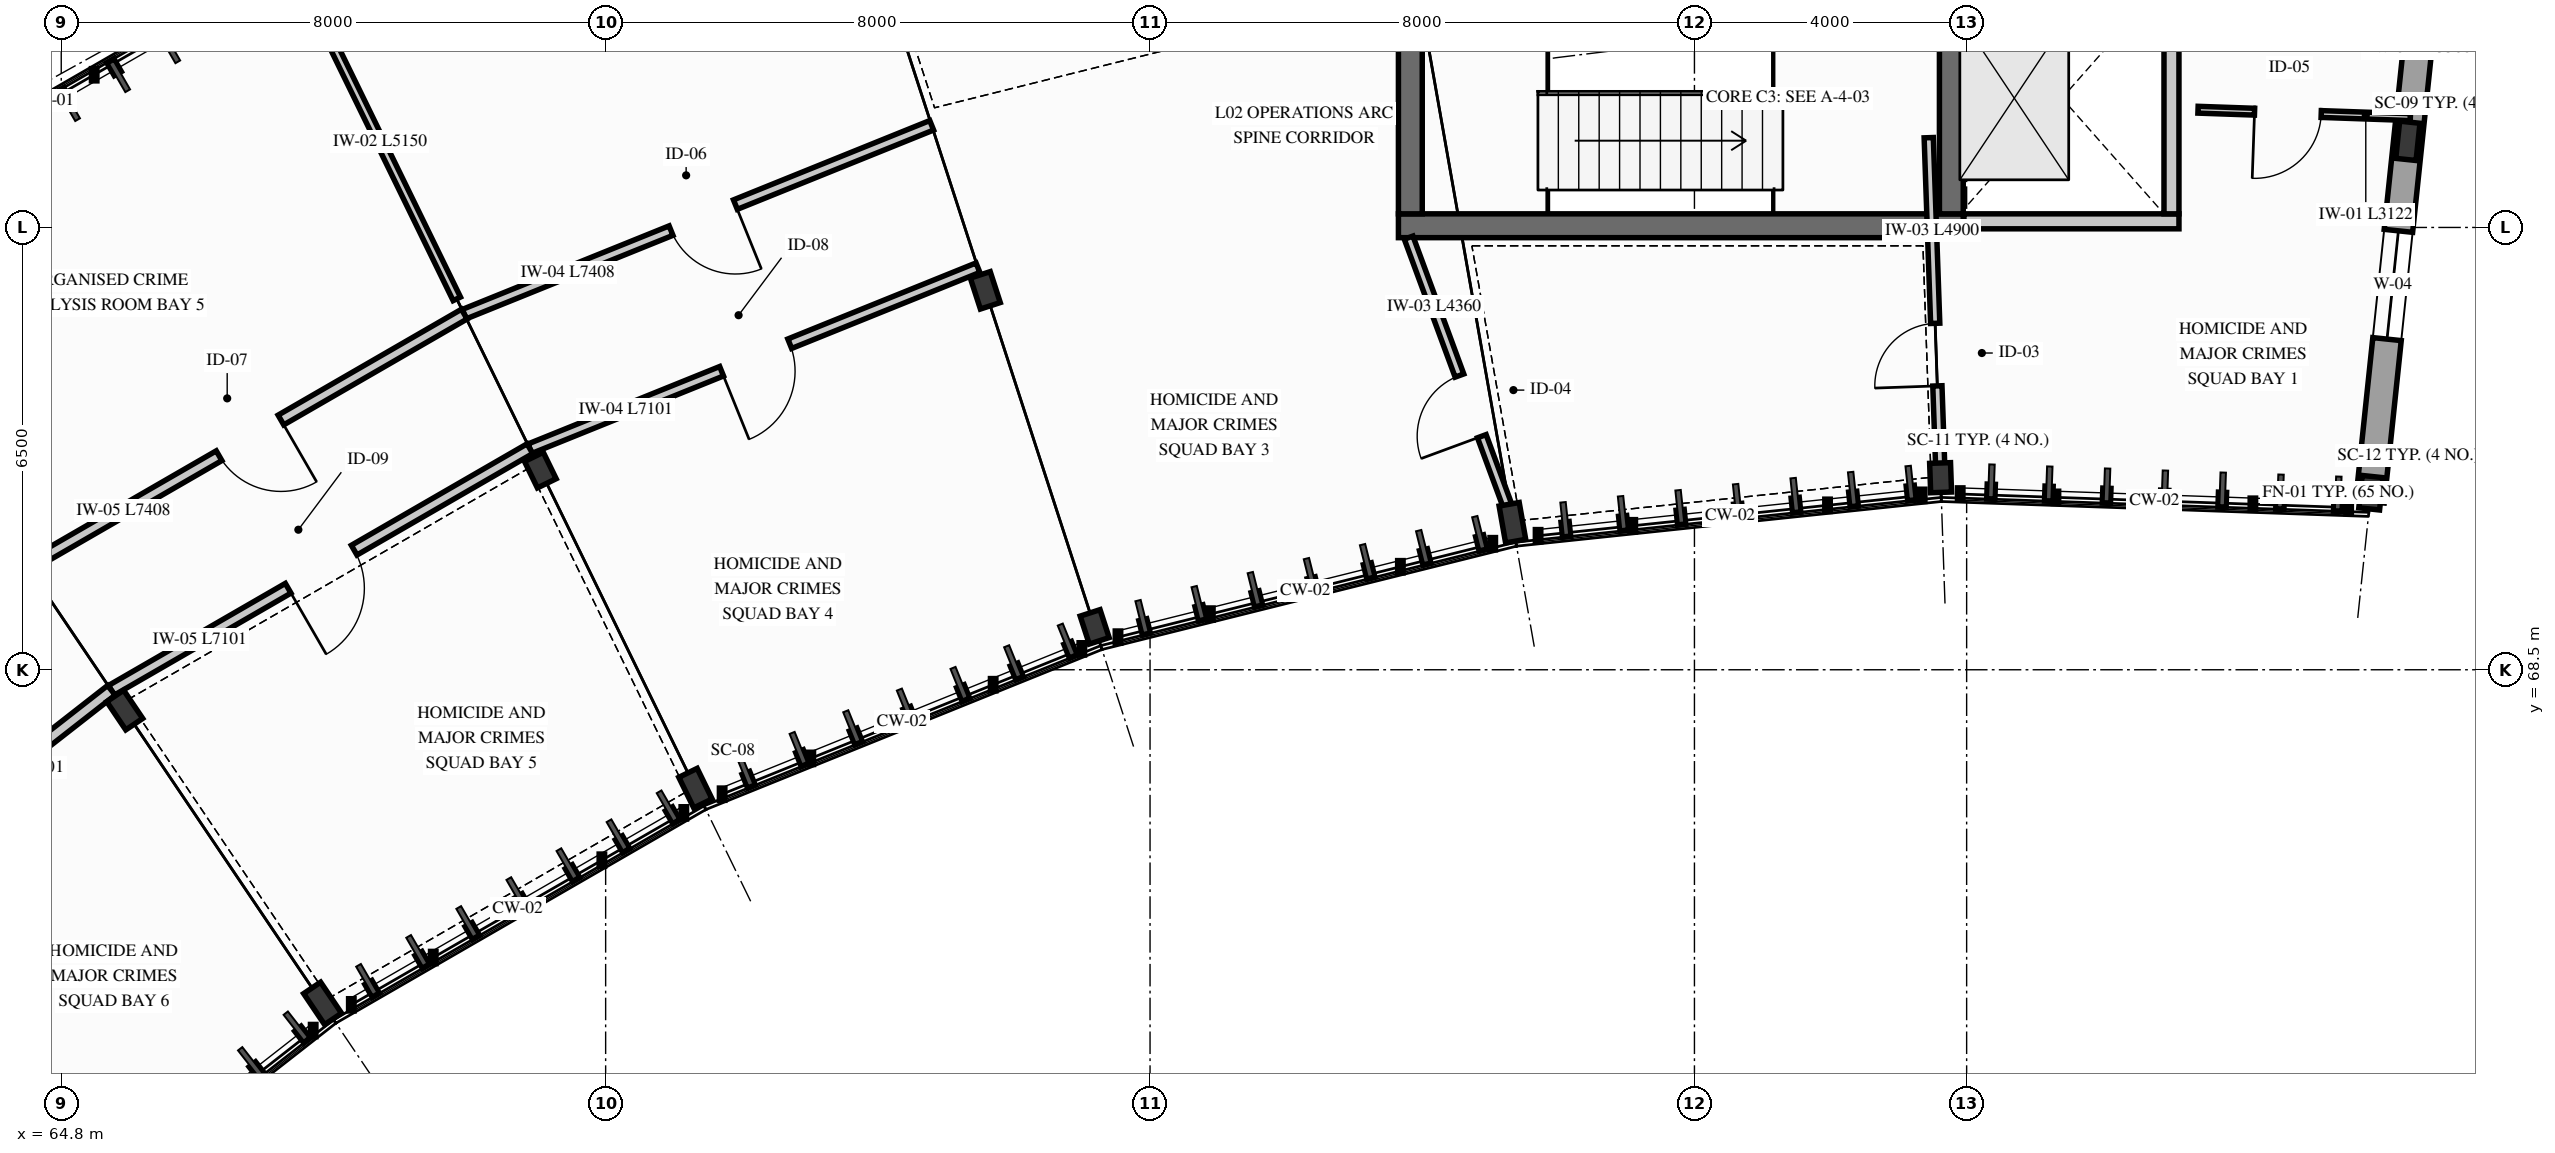
"""IFC4 building model, lengths in metres.
Left out: names, types, materials, properties, quantities, classifications, styles, units other than length and angle.
Written with IfcOpenShell. Run it as: python <this file> out.ifc"""

import sys

from ifc_helpers import new_model, si_unit, direction, frame, frame_2d, origin, origin_2d, place, context, subcontext, project, spatial, rectangle, i_section, extrude, element, fill, save


model = new_model("IFC4")
c1 = context("Model", 3, precision=1e-05, world=origin(), true_north=direction((0.0, 1.0)))
c2 = subcontext(c1, "Body", "Model", "MODEL_VIEW")
j1 = project(units=[si_unit("LENGTHUNIT", "METRE"), si_unit("PLANEANGLEUNIT", "RADIAN")], contexts=[c1])
p1 = place(None, origin())
s1 = spatial("IfcSite", under=j1, at=p1, CompositionType="ELEMENT")
p2 = place(p1, origin())
s2 = spatial("IfcBuilding", under=s1, at=p2, CompositionType="ELEMENT")
p3 = place(p2, frame((0.0, 0.0, 9.3)))
s3 = spatial("IfcBuildingStorey", under=s2, at=p3, CompositionType="ELEMENT", Elevation=9.3)
p4 = place(p3, frame((84.45, 75.025, 0.0), z_axis=(0.0, 0.0, 1.0), x_axis=(1.0, 0.0, 0.0)))
e1 = element("IfcWall", 1, at=p4, inside=s3, PredefinedType="SHEAR", context=c2, shape_type="SweptSolid", body=[
    extrude(rectangle(XDim=8.3, YDim=0.35, at=frame_2d((4.15, 0.0))), origin(), (0.0, 0.0, 1.0), 4.0),
])
p5 = place(p3, frame((84.625, 75.2, 0.0), z_axis=(0.0, 0.0, 1.0), x_axis=(0.0, 1.0, 0.0)))
e2 = element("IfcWall", 2, at=p5, inside=s3, PredefinedType="SHEAR", context=c2, shape_type="SweptSolid", body=[
    extrude(rectangle(XDim=6.8, YDim=0.35, at=frame_2d((3.4, 0.0))), origin(), (0.0, 0.0, 1.0), 4.0),
])
p6 = place(p5, frame((2.6, 0.0, 0.0)))
e3 = element("IfcOpeningElement", 3, at=p6, cuts=e2, PredefinedType="OPENING", context=c2, shape_type="SweptSolid", body=[
    extrude(rectangle(XDim=1.25, YDim=2.2, at=frame_2d((0.625, 1.1))), frame((0.0, 0.185, 0.0), z_axis=(0.0, -1.0, 0.0), x_axis=(1.0, 0.0, 0.0)), (0.0, 0.0, 1.0), 0.37),
])
p7 = place(p3, frame((92.575, 75.2, 0.0), z_axis=(0.0, 0.0, 1.0), x_axis=(0.0, 1.0, 0.0)))
e4 = element("IfcWall", 4, at=p7, inside=s3, PredefinedType="SHEAR", context=c2, shape_type="SweptSolid", body=[
    extrude(rectangle(XDim=6.8, YDim=0.35, at=frame_2d((3.4, 0.0))), origin(), (0.0, 0.0, 1.0), 4.0),
])
p8 = place(p3, frame((98.74, 71.102, 0.0), z_axis=(0.0, 0.0, 1.0), x_axis=(0.994521895368, -0.104528463268, 0.0)))
e5 = element("IfcColumn", 5, at=p8, inside=s3, PredefinedType="COLUMN", context=c2, shape_type="SweptSolid", body=[
    extrude(i_section(OverallWidth=0.307, OverallDepth=0.478, WebThickness=0.021, FlangeThickness=0.04, FilletRadius=0.027, at=origin_2d()), origin(), (0.0, 0.0, 1.0), 4.2),
])
p9 = place(p3, frame((99.284, 76.273, 0.0), z_axis=(0.0, 0.0, 1.0), x_axis=(0.994521895368, -0.104528463268, 0.0)))
e6 = element("IfcColumn", 6, at=p9, inside=s3, PredefinedType="COLUMN", context=c2, shape_type="SweptSolid", body=[
    extrude(i_section(OverallWidth=0.3, OverallDepth=0.55, WebThickness=0.015, FlangeThickness=0.029, FilletRadius=0.027, at=origin_2d()), origin(), (0.0, 0.0, 1.0), 4.2),
])
p10 = place(p3, frame((92.417, 71.323, 0.0), z_axis=(0.0, 0.0, 1.0), x_axis=(0.999390827019, 0.034899496703, 0.0)))
e7 = element("IfcColumn", 7, at=p10, inside=s3, PredefinedType="COLUMN", context=c2, shape_type="SweptSolid", body=[
    extrude(i_section(OverallWidth=0.307, OverallDepth=0.432, WebThickness=0.021, FlangeThickness=0.04, FilletRadius=0.027, at=origin_2d()), origin(), (0.0, 0.0, 1.0), 4.2),
])
p11 = place(p3, frame((86.125, 70.661, 0.0), z_axis=(0.0, 0.0, 1.0), x_axis=(0.984807753012, 0.173648177667, 0.0)))
e8 = element("IfcColumn", 8, at=p11, inside=s3, PredefinedType="COLUMN", context=c2, shape_type="SweptSolid", body=[
    extrude(i_section(OverallWidth=0.3, OverallDepth=0.55, WebThickness=0.015, FlangeThickness=0.029, FilletRadius=0.027, at=origin_2d()), origin(), (0.0, 0.0, 1.0), 4.2),
])
p12 = place(p3, frame((79.986, 69.13, 0.0), z_axis=(0.0, 0.0, 1.0), x_axis=(0.951056516295, 0.309016994375, 0.0)))
e9 = element("IfcColumn", 9, at=p12, inside=s3, PredefinedType="COLUMN", context=c2, shape_type="SweptSolid", body=[
    extrude(i_section(OverallWidth=0.307, OverallDepth=0.432, WebThickness=0.021, FlangeThickness=0.04, FilletRadius=0.027, at=origin_2d()), origin(), (0.0, 0.0, 1.0), 4.2),
])
p13 = place(p3, frame((78.379, 74.076, 0.0), z_axis=(0.0, 0.0, 1.0), x_axis=(0.951056516295, 0.309016994375, 0.0)))
e10 = element("IfcColumn", 10, at=p13, inside=s3, PredefinedType="COLUMN", context=c2, shape_type="SweptSolid", body=[
    extrude(i_section(OverallWidth=0.307, OverallDepth=0.478, WebThickness=0.021, FlangeThickness=0.04, FilletRadius=0.027, at=origin_2d()), origin(), (0.0, 0.0, 1.0), 4.2),
])
p14 = place(p3, frame((74.12, 66.76, 0.0), z_axis=(0.0, 0.0, 1.0), x_axis=(0.898794046299, 0.438371146789, 0.0)))
e11 = element("IfcColumn", 11, at=p14, inside=s3, PredefinedType="COLUMN", context=c2, shape_type="SweptSolid", body=[
    extrude(i_section(OverallWidth=0.3, OverallDepth=0.5, WebThickness=0.014, FlangeThickness=0.028, FilletRadius=0.027, at=origin_2d()), origin(), (0.0, 0.0, 1.0), 4.2),
])
p15 = place(p3, frame((71.84, 71.434, 0.0), z_axis=(0.0, 0.0, 1.0), x_axis=(0.898794046299, 0.438371146789, 0.0)))
e12 = element("IfcColumn", 12, at=p15, inside=s3, PredefinedType="COLUMN", context=c2, shape_type="SweptSolid", body=[
    extrude(i_section(OverallWidth=0.307, OverallDepth=0.432, WebThickness=0.021, FlangeThickness=0.04, FilletRadius=0.027, at=origin_2d()), origin(), (0.0, 0.0, 1.0), 4.2),
])
p16 = place(p3, frame((68.641, 63.597, 0.0), z_axis=(0.0, 0.0, 1.0), x_axis=(0.829037572555, 0.559192903471, 0.0)))
e13 = element("IfcColumn", 13, at=p16, inside=s3, PredefinedType="COLUMN", context=c2, shape_type="SweptSolid", body=[
    extrude(i_section(OverallWidth=0.3, OverallDepth=0.55, WebThickness=0.015, FlangeThickness=0.029, FilletRadius=0.027, at=origin_2d()), origin(), (0.0, 0.0, 1.0), 4.2),
])
p17 = place(p3, frame((65.733, 67.908, 0.0), z_axis=(0.0, 0.0, 1.0), x_axis=(0.829037572555, 0.559192903471, 0.0)))
e14 = element("IfcColumn", 14, at=p17, inside=s3, PredefinedType="COLUMN", context=c2, shape_type="SweptSolid", body=[
    extrude(i_section(OverallWidth=0.3, OverallDepth=0.5, WebThickness=0.014, FlangeThickness=0.028, FilletRadius=0.027, at=origin_2d()), origin(), (0.0, 0.0, 1.0), 4.2),
])
p18 = place(p3, frame((98.727, 70.972, 0.0), z_axis=(0.0, 0.0, 1.0), x_axis=(0.104534827036, 0.994521226489, 0.0)))
e15 = element("IfcWall", 15, at=p18, inside=s3, PredefinedType="SOLIDWALL", context=c2, shape_type="SweptSolid", body=[
    extrude(rectangle(XDim=13.56, YDim=0.42, at=frame_2d((6.78, 0.0))), origin(), (0.0, 0.0, 1.0), 3.55),
])
p19 = place(p18, frame((2.4, 0.0, 0.74)))
e16 = element("IfcOpeningElement", 16, at=p19, cuts=e15, PredefinedType="OPENING", context=c2, shape_type="SweptSolid", body=[
    extrude(rectangle(XDim=1.6, YDim=2.4, at=frame_2d((0.8, 1.2))), frame((0.0, 0.22, 0.0), z_axis=(0.0, -1.0, 0.0), x_axis=(1.0, 0.0, 0.0)), (0.0, 0.0, 1.0), 0.44),
])
p20 = place(p18, frame((9.4, 0.0, 0.74)))
e17 = element("IfcOpeningElement", 17, at=p20, cuts=e15, PredefinedType="OPENING", context=c2, shape_type="SweptSolid", body=[
    extrude(rectangle(XDim=1.6, YDim=2.4, at=frame_2d((0.8, 1.2))), frame((0.0, 0.22, 0.0), z_axis=(0.0, -1.0, 0.0), x_axis=(1.0, 0.0, 0.0)), (0.0, 0.0, 1.0), 0.44),
])
p21 = place(p3, frame((92.76, 75.09, 0.0), z_axis=(0.0, 0.0, 1.0), x_axis=(1.0, 0.0, 0.0)))
e18 = element("IfcWall", 18, at=p21, inside=s3, PredefinedType="PARTITIONING", context=c2, shape_type="SweptSolid", body=[
    extrude(rectangle(XDim=3.16, YDim=0.22, at=frame_2d((1.58, 0.0))), origin(), (0.0, 0.0, 1.0), 3.92),
])
p22 = place(p3, frame((95.81, 75.2, 0.0), z_axis=(0.0, 0.0, 1.0), x_axis=(0.0, 1.0, 0.0)))
e19 = element("IfcWall", 19, at=p22, inside=s3, PredefinedType="PARTITIONING", context=c2, shape_type="SweptSolid", body=[
    extrude(rectangle(XDim=3.4, YDim=0.22, at=frame_2d((1.7, 0.0))), origin(), (0.0, 0.0, 1.0), 3.92),
])
p23 = place(p3, frame((92.414, 71.422, 0.0), z_axis=(0.0, 0.0, 1.0), x_axis=(-0.034877560821, 0.999391592796, 0.0)))
e20 = element("IfcWall", 20, at=p23, inside=s3, PredefinedType="PARTITIONING", context=c2, shape_type="SweptSolid", body=[
    extrude(rectangle(XDim=4.9, YDim=0.135, at=frame_2d((2.45, 0.0))), origin(), (0.0, 0.0, 1.0), 3.92),
])
p24 = place(p23, frame((1.25, 0.0, 0.0)))
e21 = element("IfcOpeningElement", 21, at=p24, cuts=e20, PredefinedType="OPENING", context=c2, shape_type="SweptSolid", body=[
    extrude(rectangle(XDim=0.92, YDim=2.12, at=frame_2d((0.46, 1.06))), frame((0.0, 0.077, 0.0), z_axis=(0.0, -1.0, 0.0), x_axis=(1.0, 0.0, 0.0)), (0.0, 0.0, 1.0), 0.155),
])
p25 = place(p3, frame((86.108, 70.76, 0.0), z_axis=(0.0, 0.0, 1.0), x_axis=(-0.345809164341, 0.938304866159, 0.0)))
e22 = element("IfcWall", 22, at=p25, inside=s3, PredefinedType="PARTITIONING", context=c2, shape_type="SweptSolid", body=[
    extrude(rectangle(XDim=4.36, YDim=0.135, at=frame_2d((2.18, 0.0))), origin(), (0.0, 0.0, 1.0), 3.92),
])
p26 = place(p25, frame((1.25, 0.0, 0.0)))
e23 = element("IfcOpeningElement", 23, at=p26, cuts=e22, PredefinedType="OPENING", context=c2, shape_type="SweptSolid", body=[
    extrude(rectangle(XDim=0.95, YDim=2.15, at=frame_2d((0.475, 1.075))), frame((0.0, 0.077, 0.0), z_axis=(0.0, -1.0, 0.0), x_axis=(1.0, 0.0, 0.0)), (0.0, 0.0, 1.0), 0.155),
])
p27 = place(p3, frame((99.321, 76.621, 0.0), z_axis=(0.0, 0.0, 1.0), x_axis=(-0.999389073029, 0.034949688284, 0.0)))
e24 = element("IfcWall", 24, at=p27, inside=s3, PredefinedType="PARTITIONING", context=c2, shape_type="SweptSolid", body=[
    extrude(rectangle(XDim=3.123, YDim=0.1, at=frame_2d((1.561, 0.0))), origin(), (0.0, 0.0, 1.0), 3.92),
])
p28 = place(p27, frame((1.311, 0.0, 0.0)))
e25 = element("IfcOpeningElement", 25, at=p28, cuts=e24, PredefinedType="OPENING", context=c2, shape_type="SweptSolid", body=[
    extrude(rectangle(XDim=0.98, YDim=2.16, at=frame_2d((0.49, 1.08))), frame((0.0, 0.06, 0.0), z_axis=(0.0, -1.0, 0.0), x_axis=(1.0, 0.0, 0.0)), (0.0, 0.0, 1.0), 0.12),
])
p29 = place(p3, frame((78.271, 74.409, 0.0), z_axis=(0.0, 0.0, 1.0), x_axis=(-0.927181218568, -0.374613117677, 0.0)))
e26 = element("IfcWall", 26, at=p29, inside=s3, PredefinedType="PARTITIONING", context=c2, shape_type="SweptSolid", body=[
    extrude(rectangle(XDim=7.101, YDim=0.15, at=frame_2d((3.551, 0.0))), origin(), (0.0, 0.0, 1.0), 3.92),
])
p30 = place(p29, frame((2.983, 0.0, 0.0)))
e27 = element("IfcOpeningElement", 27, at=p30, cuts=e26, PredefinedType="OPENING", context=c2, shape_type="SweptSolid", body=[
    extrude(rectangle(XDim=1.08, YDim=2.22, at=frame_2d((0.54, 1.11))), frame((0.0, 0.085, 0.0), z_axis=(0.0, -1.0, 0.0), x_axis=(1.0, 0.0, 0.0)), (0.0, 0.0, 1.0), 0.17),
])
p31 = place(p3, frame((77.591, 76.501, 0.0), z_axis=(0.0, 0.0, 1.0), x_axis=(-0.927187035022, -0.374598721418, 0.0)))
e28 = element("IfcWall", 28, at=p31, inside=s3, PredefinedType="PARTITIONING", context=c2, shape_type="SweptSolid", body=[
    extrude(rectangle(XDim=7.408, YDim=0.15, at=frame_2d((3.704, 0.0))), origin(), (0.0, 0.0, 1.0), 3.92),
])
p32 = place(p31, frame((3.111, 0.0, 0.0)))
e29 = element("IfcOpeningElement", 29, at=p32, cuts=e28, PredefinedType="OPENING", context=c2, shape_type="SweptSolid", body=[
    extrude(rectangle(XDim=1.02, YDim=2.18, at=frame_2d((0.51, 1.09))), frame((0.0, 0.085, 0.0), z_axis=(0.0, -1.0, 0.0), x_axis=(1.0, 0.0, 0.0)), (0.0, 0.0, 1.0), 0.17),
])
p33 = place(p3, frame((70.613, 73.951, 0.0), z_axis=(0.0, 0.0, 1.0), x_axis=(-0.438355450259, 0.898801701839, 0.0)))
e30 = element("IfcWall", 30, at=p33, inside=s3, PredefinedType="PARTITIONING", context=c2, shape_type="SweptSolid", body=[
    extrude(rectangle(XDim=5.15, YDim=0.12, at=frame_2d((2.575, 0.0))), origin(), (0.0, 0.0, 1.0), 3.55),
])
p34 = place(p3, frame((71.687, 71.749, 0.0), z_axis=(0.0, 0.0, 1.0), x_axis=(-0.866032151687, -0.499988312107, 0.0)))
e31 = element("IfcWall", 31, at=p34, inside=s3, PredefinedType="PARTITIONING", context=c2, shape_type="SweptSolid", body=[
    extrude(rectangle(XDim=7.101, YDim=0.165, at=frame_2d((3.551, 0.0))), origin(), (0.0, 0.0, 1.0), 3.92),
])
p35 = place(p34, frame((2.982, 0.0, 0.0)))
e32 = element("IfcOpeningElement", 32, at=p35, cuts=e31, PredefinedType="OPENING", context=c2, shape_type="SweptSolid", body=[
    extrude(rectangle(XDim=1.12, YDim=2.2, at=frame_2d((0.56, 1.1))), frame((0.0, 0.093, 0.0), z_axis=(0.0, -1.0, 0.0), x_axis=(1.0, 0.0, 0.0)), (0.0, 0.0, 1.0), 0.185),
])
p36 = place(p3, frame((70.722, 73.726, 0.0), z_axis=(0.0, 0.0, 1.0), x_axis=(-0.866019843608, -0.500009630384, 0.0)))
e33 = element("IfcWall", 33, at=p36, inside=s3, PredefinedType="PARTITIONING", context=c2, shape_type="SweptSolid", body=[
    extrude(rectangle(XDim=7.408, YDim=0.165, at=frame_2d((3.704, 0.0))), origin(), (0.0, 0.0, 1.0), 3.92),
])
p37 = place(p36, frame((3.111, 0.0, 0.0)))
e34 = element("IfcOpeningElement", 34, at=p37, cuts=e33, PredefinedType="OPENING", context=c2, shape_type="SweptSolid", body=[
    extrude(rectangle(XDim=1.05, YDim=2.2, at=frame_2d((0.525, 1.1))), frame((0.0, 0.093, 0.0), z_axis=(0.0, -1.0, 0.0), x_axis=(1.0, 0.0, 0.0)), (0.0, 0.0, 1.0), 0.185),
])
p38 = place(p3, frame((65.537, 68.198, 0.0), z_axis=(0.0, 0.0, 1.0), x_axis=(-0.788011863809, -0.615660054329, 0.0)))
e35 = element("IfcWall", 35, at=p38, inside=s3, PredefinedType="PARTITIONING", context=c2, shape_type="SweptSolid", body=[
    extrude(rectangle(XDim=7.101, YDim=0.18, at=frame_2d((3.551, 0.0))), origin(), (0.0, 0.0, 1.0), 3.92),
])
p39 = place(p38, frame((2.982, 0.0, 0.0)))
e36 = element("IfcOpeningElement", 36, at=p39, cuts=e35, PredefinedType="OPENING", context=c2, shape_type="SweptSolid", body=[
    extrude(rectangle(XDim=1.15, YDim=2.2, at=frame_2d((0.575, 1.1))), frame((0.0, 0.1, 0.0), z_axis=(0.0, -1.0, 0.0), x_axis=(1.0, 0.0, 0.0)), (0.0, 0.0, 1.0), 0.2),
])
p40 = place(p19, origin())
e37 = element("IfcWindow", 37, at=p40, inside=s3, PartitioningType="SINGLE_PANEL", PredefinedType="WINDOW", context=c2, shape_type="SweptSolid", body=[
    extrude(rectangle(XDim=1.6, YDim=2.4, at=frame_2d((0.8, 1.2))), frame((0.0, 0.03, 0.0), z_axis=(0.0, -1.0, 0.0), x_axis=(1.0, 0.0, 0.0)), (0.0, 0.0, 1.0), 0.06),
])
fill(e16, e37)
p41 = place(p24, origin())
e38 = element("IfcDoor", 38, at=p41, inside=s3, OperationType="SINGLE_SWING_LEFT", PredefinedType="DOOR", context=c2, shape_type="SweptSolid", body=[
    extrude(rectangle(XDim=0.92, YDim=2.12, at=frame_2d((0.46, 1.06))), frame((0.0, 0.025, 0.0), z_axis=(0.0, -1.0, 0.0), x_axis=(1.0, 0.0, 0.0)), (0.0, 0.0, 1.0), 0.05),
])
fill(e21, e38)
p42 = place(p26, origin())
e39 = element("IfcDoor", 39, at=p42, inside=s3, OperationType="SINGLE_SWING_LEFT", PredefinedType="DOOR", context=c2, shape_type="SweptSolid", body=[
    extrude(rectangle(XDim=0.95, YDim=2.15, at=frame_2d((0.475, 1.075))), frame((0.0, 0.025, 0.0), z_axis=(0.0, -1.0, 0.0), x_axis=(1.0, 0.0, 0.0)), (0.0, 0.0, 1.0), 0.05),
])
fill(e23, e39)
p43 = place(p28, origin())
e40 = element("IfcDoor", 40, at=p43, inside=s3, OperationType="SINGLE_SWING_RIGHT", PredefinedType="DOOR", context=c2, shape_type="SweptSolid", body=[
    extrude(rectangle(XDim=0.98, YDim=2.16, at=frame_2d((0.49, 1.08))), frame((0.0, 0.025, 0.0), z_axis=(0.0, -1.0, 0.0), x_axis=(1.0, 0.0, 0.0)), (0.0, 0.0, 1.0), 0.05),
])
fill(e25, e40)
p44 = place(p30, origin())
e41 = element("IfcDoor", 41, at=p44, inside=s3, OperationType="SINGLE_SWING_RIGHT", PredefinedType="DOOR", context=c2, shape_type="SweptSolid", body=[
    extrude(rectangle(XDim=1.08, YDim=2.22, at=frame_2d((0.54, 1.11))), frame((0.0, 0.025, 0.0), z_axis=(0.0, -1.0, 0.0), x_axis=(1.0, 0.0, 0.0)), (0.0, 0.0, 1.0), 0.05),
])
fill(e27, e41)
p45 = place(p32, origin())
e42 = element("IfcDoor", 42, at=p45, inside=s3, OperationType="SINGLE_SWING_LEFT", PredefinedType="DOOR", context=c2, shape_type="SweptSolid", body=[
    extrude(rectangle(XDim=1.02, YDim=2.18, at=frame_2d((0.51, 1.09))), frame((0.0, 0.025, 0.0), z_axis=(0.0, -1.0, 0.0), x_axis=(1.0, 0.0, 0.0)), (0.0, 0.0, 1.0), 0.05),
])
fill(e29, e42)
p46 = place(p35, origin())
e43 = element("IfcDoor", 43, at=p46, inside=s3, OperationType="SINGLE_SWING_RIGHT", PredefinedType="DOOR", context=c2, shape_type="SweptSolid", body=[
    extrude(rectangle(XDim=1.12, YDim=2.2, at=frame_2d((0.56, 1.1))), frame((0.0, 0.025, 0.0), z_axis=(0.0, -1.0, 0.0), x_axis=(1.0, 0.0, 0.0)), (0.0, 0.0, 1.0), 0.05),
])
fill(e32, e43)
p47 = place(p37, origin())
e44 = element("IfcDoor", 44, at=p47, inside=s3, OperationType="SINGLE_SWING_LEFT", PredefinedType="DOOR", context=c2, shape_type="SweptSolid", body=[
    extrude(rectangle(XDim=1.05, YDim=2.2, at=frame_2d((0.525, 1.1))), frame((0.0, 0.025, 0.0), z_axis=(0.0, -1.0, 0.0), x_axis=(1.0, 0.0, 0.0)), (0.0, 0.0, 1.0), 0.05),
])
fill(e34, e44)
save(model, sys.argv[1])
